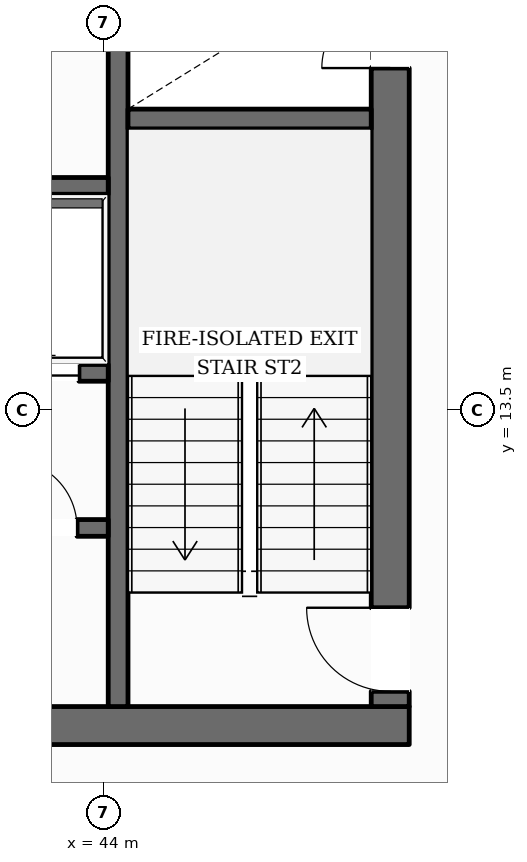
"""IFC4 building model, lengths in metres.
Left out: names, types, materials, properties, quantities, classifications, styles, units other than length and angle.
Written with IfcOpenShell. Run it as: python <this file> out.ifc"""

import sys

from ifc_helpers import new_model, si_unit, direction, frame, frame_2d, origin, place, context, subcontext, project, spatial, rectangle, extrude, element, fill, save


model = new_model("IFC4")
c1 = context("Model", 3, precision=1e-05, world=origin(), true_north=direction((0.0, 1.0)))
c2 = subcontext(c1, "Body", "Model", "MODEL_VIEW")
j1 = project(units=[si_unit("LENGTHUNIT", "METRE"), si_unit("PLANEANGLEUNIT", "RADIAN")], contexts=[c1])
p1 = place(None, origin())
s1 = spatial("IfcSite", under=j1, at=p1, CompositionType="ELEMENT")
p2 = place(p1, origin())
s2 = spatial("IfcBuilding", under=s1, at=p2, CompositionType="ELEMENT")
p3 = place(p2, frame((0.0, 0.0, 127.85)))
s3 = spatial("IfcBuildingStorey", under=s2, at=p3, CompositionType="ELEMENT", Elevation=127.85)
p4 = place(p3, frame((27.98, 9.35, 0.0), z_axis=(0.0, 0.0, 1.0), x_axis=(1.0, 0.0, 0.0)))
e1 = element("IfcWall", 1, at=p4, inside=s3, PredefinedType="SOLIDWALL", context=c2, shape_type="SweptSolid", body=[
    extrude(rectangle(XDim=20.04, YDim=0.5, at=frame_2d((10.02, 0.0))), origin(), (0.0, 0.0, 1.0), 3.6),
])
p5 = place(p4, frame((10.52, 0.0, 0.0)))
e2 = element("IfcOpeningElement", 2, at=p5, cuts=e1, PredefinedType="OPENING", context=c2, shape_type="SweptSolid", body=[
    extrude(rectangle(XDim=1.4, YDim=2.2, at=frame_2d((0.7, 1.1))), frame((0.0, 0.26, 0.0), z_axis=(0.0, -1.0, 0.0), x_axis=(1.0, 0.0, 0.0)), (0.0, 0.0, 1.0), 0.52),
])
p6 = place(p3, frame((47.77, 9.6, 0.0), z_axis=(0.0, 0.0, 1.0), x_axis=(0.0, 1.0, 0.0)))
e3 = element("IfcWall", 3, at=p6, inside=s3, PredefinedType="SOLIDWALL", context=c2, shape_type="SweptSolid", body=[
    extrude(rectangle(XDim=13.0, YDim=0.5, at=frame_2d((6.5, 0.0))), origin(), (0.0, 0.0, 1.0), 3.6),
])
p7 = place(p6, frame((0.2, 0.0, 0.0)))
e4 = element("IfcOpeningElement", 4, at=p7, cuts=e3, PredefinedType="OPENING", context=c2, shape_type="SweptSolid", body=[
    extrude(rectangle(XDim=1.1, YDim=2.15, at=frame_2d((0.55, 1.075))), frame((0.0, 0.26, 0.0), z_axis=(0.0, -1.0, 0.0), x_axis=(1.0, 0.0, 0.0)), (0.0, 0.0, 1.0), 0.52),
])
p8 = place(p6, frame((8.4, 0.0, 0.0)))
e5 = element("IfcOpeningElement", 5, at=p8, cuts=e3, PredefinedType="OPENING", context=c2, shape_type="SweptSolid", body=[
    extrude(rectangle(XDim=0.9, YDim=2.1, at=frame_2d((0.45, 1.05))), frame((0.0, 0.26, 0.0), z_axis=(0.0, -1.0, 0.0), x_axis=(1.0, 0.0, 0.0)), (0.0, 0.0, 1.0), 0.52),
])
p9 = place(p3, frame((44.19, 9.6, 0.0), z_axis=(0.0, 0.0, 1.0), x_axis=(0.0, 1.0, 0.0)))
e6 = element("IfcWall", 6, at=p9, inside=s3, PredefinedType="SHEAR", context=c2, shape_type="SweptSolid", body=[
    extrude(rectangle(XDim=13.0, YDim=0.26, at=frame_2d((6.5, 0.0))), origin(), (0.0, 0.0, 1.0), 3.6),
])
p10 = place(p9, frame((10.925, 0.0, 0.0)))
e7 = element("IfcOpeningElement", 7, at=p10, cuts=e6, PredefinedType="OPENING", context=c2, shape_type="SweptSolid", body=[
    extrude(rectangle(XDim=1.25, YDim=2.25, at=frame_2d((0.625, 1.125))), frame((0.0, 0.14, 0.0), z_axis=(0.0, -1.0, 0.0), x_axis=(1.0, 0.0, 0.0)), (0.0, 0.0, 1.0), 0.28),
])
p11 = place(p3, frame((44.32, 17.33, 0.0), z_axis=(0.0, 0.0, 1.0), x_axis=(1.0, 0.0, 0.0)))
e8 = element("IfcWall", 8, at=p11, inside=s3, PredefinedType="SHEAR", context=c2, shape_type="SweptSolid", body=[
    extrude(rectangle(XDim=3.2, YDim=0.26, at=frame_2d((1.6, 0.0))), origin(), (0.0, 0.0, 1.0), 3.6),
])
p12 = place(p3, frame((31.94, 16.45, 0.0), z_axis=(0.0, 0.0, 1.0), x_axis=(1.0, 0.0, 0.0)))
e9 = element("IfcWall", 9, at=p12, inside=s3, PredefinedType="SOLIDWALL", context=c2, shape_type="SweptSolid", body=[
    extrude(rectangle(XDim=12.12, YDim=0.22, at=frame_2d((6.06, 0.0))), origin(), (0.0, 0.0, 1.0), 3.6),
])
p13 = place(p3, frame((31.94, 13.99, 0.0), z_axis=(0.0, 0.0, 1.0), x_axis=(1.0, 0.0, 0.0)))
e10 = element("IfcWall", 10, at=p13, inside=s3, PredefinedType="SOLIDWALL", context=c2, shape_type="SweptSolid", body=[
    extrude(rectangle(XDim=12.12, YDim=0.22, at=frame_2d((6.06, 0.0))), origin(), (0.0, 0.0, 1.0), 3.6),
])
p14 = place(p13, frame((2.51, 0.0, 0.0)))
e11 = element("IfcOpeningElement", 11, at=p14, cuts=e10, PredefinedType="OPENING", context=c2, shape_type="SweptSolid", body=[
    extrude(rectangle(XDim=0.9, YDim=2.1, at=frame_2d((0.45, 1.05))), frame((0.0, 0.12, 0.0), z_axis=(0.0, -1.0, 0.0), x_axis=(1.0, 0.0, 0.0)), (0.0, 0.0, 1.0), 0.24),
])
p15 = place(p13, frame((6.535, 0.0, 0.0)))
e12 = element("IfcOpeningElement", 12, at=p15, cuts=e10, PredefinedType="OPENING", context=c2, shape_type="SweptSolid", body=[
    extrude(rectangle(XDim=1.1, YDim=2.2, at=frame_2d((0.55, 1.1))), frame((0.0, 0.12, 0.0), z_axis=(0.0, -1.0, 0.0), x_axis=(1.0, 0.0, 0.0)), (0.0, 0.0, 1.0), 0.24),
])
p16 = place(p13, frame((8.585, 0.0, 0.0)))
e13 = element("IfcOpeningElement", 13, at=p16, cuts=e10, PredefinedType="OPENING", context=c2, shape_type="SweptSolid", body=[
    extrude(rectangle(XDim=1.1, YDim=2.2, at=frame_2d((0.55, 1.1))), frame((0.0, 0.12, 0.0), z_axis=(0.0, -1.0, 0.0), x_axis=(1.0, 0.0, 0.0)), (0.0, 0.0, 1.0), 0.24),
])
p17 = place(p13, frame((10.635, 0.0, 0.0)))
e14 = element("IfcOpeningElement", 14, at=p17, cuts=e10, PredefinedType="OPENING", context=c2, shape_type="SweptSolid", body=[
    extrude(rectangle(XDim=1.1, YDim=2.2, at=frame_2d((0.55, 1.1))), frame((0.0, 0.12, 0.0), z_axis=(0.0, -1.0, 0.0), x_axis=(1.0, 0.0, 0.0)), (0.0, 0.0, 1.0), 0.24),
])
p18 = place(p3, frame((40.28, 11.95, 0.0), z_axis=(0.0, 0.0, 1.0), x_axis=(1.0, 0.0, 0.0)))
e15 = element("IfcWall", 15, at=p18, inside=s3, PredefinedType="SOLIDWALL", context=c2, shape_type="SweptSolid", body=[
    extrude(rectangle(XDim=3.78, YDim=0.22, at=frame_2d((1.89, 0.0))), origin(), (0.0, 0.0, 1.0), 3.6),
])
p19 = place(p18, frame((0.62, 0.0, 0.0)))
e16 = element("IfcOpeningElement", 16, at=p19, cuts=e15, PredefinedType="OPENING", context=c2, shape_type="SweptSolid", body=[
    extrude(rectangle(XDim=0.9, YDim=2.1, at=frame_2d((0.45, 1.05))), frame((0.0, 0.12, 0.0), z_axis=(0.0, -1.0, 0.0), x_axis=(1.0, 0.0, 0.0)), (0.0, 0.0, 1.0), 0.24),
])
p20 = place(p18, frame((2.47, 0.0, 0.0)))
e17 = element("IfcOpeningElement", 17, at=p20, cuts=e15, PredefinedType="OPENING", context=c2, shape_type="SweptSolid", body=[
    extrude(rectangle(XDim=0.9, YDim=2.1, at=frame_2d((0.45, 1.05))), frame((0.0, 0.12, 0.0), z_axis=(0.0, -1.0, 0.0), x_axis=(1.0, 0.0, 0.0)), (0.0, 0.0, 1.0), 0.24),
])
p21 = place(p3, frame((43.789, 44.317, 0.0), z_axis=(0.0, 0.0, 1.0), x_axis=(0.506589674511, -0.862187277613, 0.0)))
e18 = element("IfcWall", 18, at=p21, inside=s3, PredefinedType="STANDARD", context=c2, shape_type="SweptSolid", body=[
    extrude(rectangle(XDim=37.135, YDim=0.38, at=frame_2d((18.568, 0.0))), origin(), (0.0, 0.0, 1.0), 3.059),
])
p22 = place(p21, frame((27.252, 0.0, 0.0)))
e19 = element("IfcOpeningElement", 19, at=p22, cuts=e18, PredefinedType="OPENING", context=c2, shape_type="SweptSolid", body=[
    extrude(rectangle(XDim=1.0, YDim=2.2, at=frame_2d((0.5, 1.1))), frame((0.0, 0.2, 0.0), z_axis=(0.0, -1.0, 0.0), x_axis=(1.0, 0.0, 0.0)), (0.0, 0.0, 1.0), 0.4),
])
p23 = place(p21, frame((32.865, 0.0, 0.65)))
e20 = element("IfcOpeningElement", 20, at=p23, cuts=e18, PredefinedType="OPENING", context=c2, shape_type="SweptSolid", body=[
    extrude(rectangle(XDim=1.55, YDim=1.75, at=frame_2d((0.775, 0.875))), frame((0.0, 0.2, 0.0), z_axis=(0.0, -1.0, 0.0), x_axis=(1.0, 0.0, 0.0)), (0.0, 0.0, 1.0), 0.4),
])
p24 = place(p21, frame((20.804, 0.0, 0.65)))
e21 = element("IfcOpeningElement", 21, at=p24, cuts=e18, PredefinedType="OPENING", context=c2, shape_type="SweptSolid", body=[
    extrude(rectangle(XDim=1.55, YDim=1.75, at=frame_2d((0.775, 0.875))), frame((0.0, 0.2, 0.0), z_axis=(0.0, -1.0, 0.0), x_axis=(1.0, 0.0, 0.0)), (0.0, 0.0, 1.0), 0.4),
])
p25 = place(p21, frame((8.744, 0.0, 0.65)))
e22 = element("IfcOpeningElement", 22, at=p25, cuts=e18, PredefinedType="OPENING", context=c2, shape_type="SweptSolid", body=[
    extrude(rectangle(XDim=1.55, YDim=1.75, at=frame_2d((0.775, 0.875))), frame((0.0, 0.2, 0.0), z_axis=(0.0, -1.0, 0.0), x_axis=(1.0, 0.0, 0.0)), (0.0, 0.0, 1.0), 0.4),
])
p26 = place(p21, frame((2.714, 0.0, 0.65)))
e23 = element("IfcOpeningElement", 23, at=p26, cuts=e18, PredefinedType="OPENING", context=c2, shape_type="SweptSolid", body=[
    extrude(rectangle(XDim=1.55, YDim=1.75, at=frame_2d((0.775, 0.875))), frame((0.0, 0.2, 0.0), z_axis=(0.0, -1.0, 0.0), x_axis=(1.0, 0.0, 0.0)), (0.0, 0.0, 1.0), 0.4),
])
p27 = place(p7, origin())
e24 = element("IfcDoor", 24, at=p27, inside=s3, OperationType="SINGLE_SWING_RIGHT", PredefinedType="DOOR", context=c2, shape_type="SweptSolid", body=[
    extrude(rectangle(XDim=1.1, YDim=2.15, at=frame_2d((0.55, 1.075))), frame((0.0, 0.025, 0.0), z_axis=(0.0, -1.0, 0.0), x_axis=(1.0, 0.0, 0.0)), (0.0, 0.0, 1.0), 0.05),
])
fill(e4, e24)
p28 = place(p8, origin())
e25 = element("IfcDoor", 25, at=p28, inside=s3, OperationType="SINGLE_SWING_LEFT", PredefinedType="DOOR", context=c2, shape_type="SweptSolid", body=[
    extrude(rectangle(XDim=0.9, YDim=2.1, at=frame_2d((0.45, 1.05))), frame((0.0, 0.025, 0.0), z_axis=(0.0, -1.0, 0.0), x_axis=(1.0, 0.0, 0.0)), (0.0, 0.0, 1.0), 0.05),
])
fill(e5, e25)
p29 = place(p17, origin())
e26 = element("IfcDoor", 26, at=p29, inside=s3, OperationType="DOUBLE_DOOR_SLIDING", PredefinedType="DOOR", context=c2, shape_type="SweptSolid", body=[
    extrude(rectangle(XDim=1.1, YDim=2.2, at=frame_2d((0.55, 1.1))), frame((0.0, 0.025, 0.0), z_axis=(0.0, -1.0, 0.0), x_axis=(1.0, 0.0, 0.0)), (0.0, 0.0, 1.0), 0.05),
])
fill(e14, e26)
p30 = place(p20, origin())
e27 = element("IfcDoor", 27, at=p30, inside=s3, OperationType="SINGLE_SWING_LEFT", PredefinedType="DOOR", context=c2, shape_type="SweptSolid", body=[
    extrude(rectangle(XDim=0.9, YDim=2.1, at=frame_2d((0.45, 1.05))), frame((0.0, 0.025, 0.0), z_axis=(0.0, -1.0, 0.0), x_axis=(1.0, 0.0, 0.0)), (0.0, 0.0, 1.0), 0.05),
])
fill(e17, e27)
save(model, sys.argv[1])
